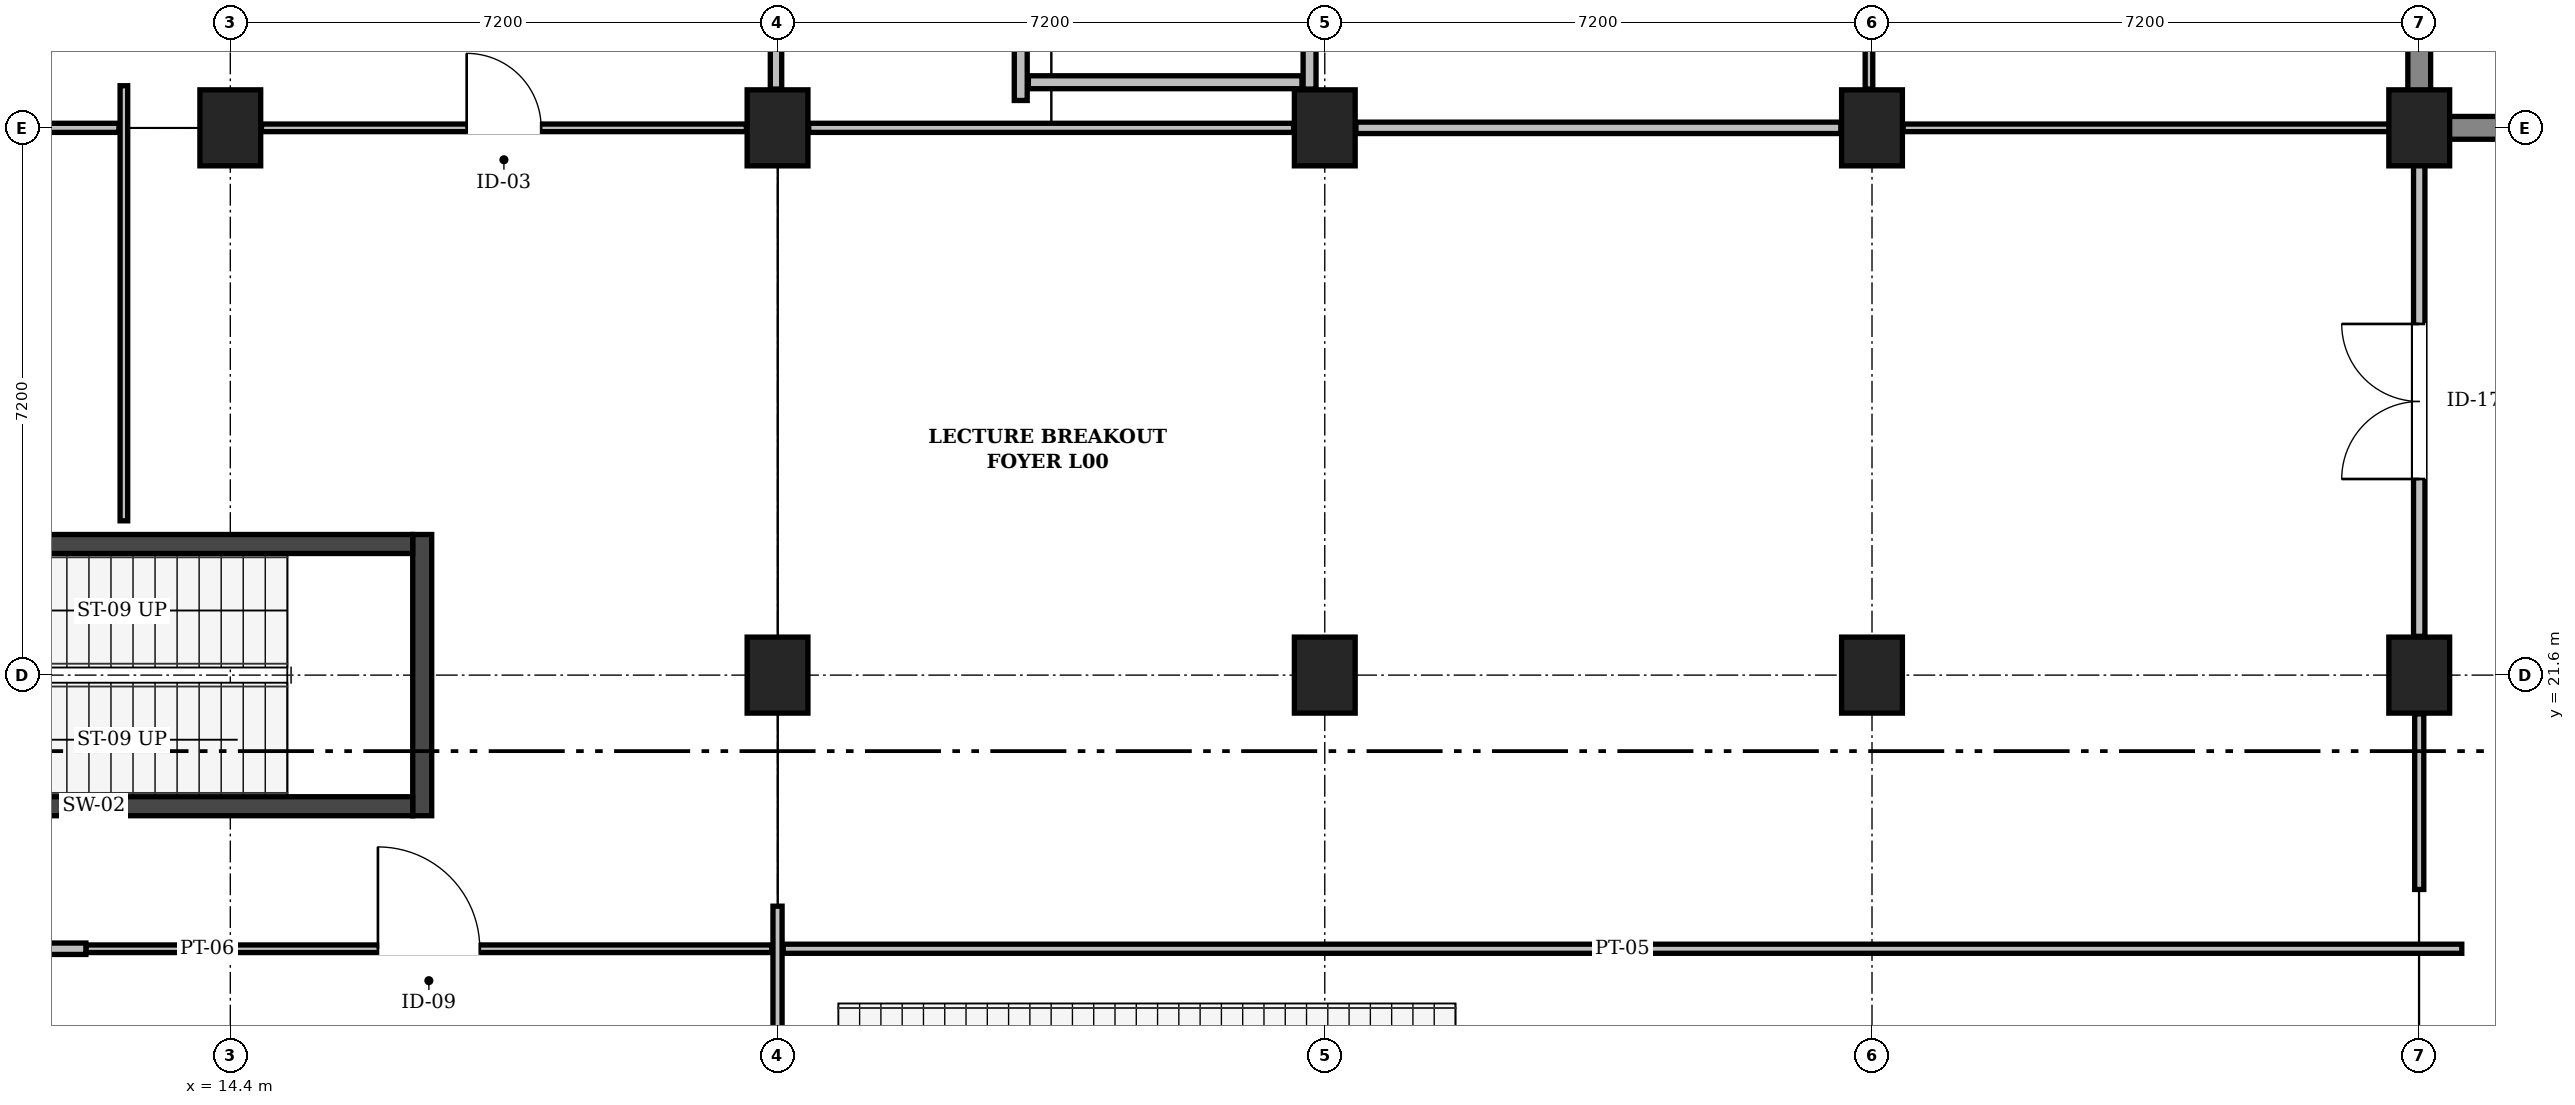
"""IFC4 building model, lengths in metres.
Left out: names, types, materials, properties, quantities, classifications, styles, units other than length and angle.
Written with IfcOpenShell. Run it as: python <this file> out.ifc"""

import sys

from ifc_helpers import new_model, si_unit, direction, frame, frame_2d, origin, origin_2d, place, context, subcontext, project, spatial, rectangle, extrude, element, fill, save


model = new_model("IFC4")
c1 = context("Model", 3, precision=1e-05, world=origin(), true_north=direction((0.0, 1.0)))
c2 = subcontext(c1, "Body", "Model", "MODEL_VIEW")
j1 = project(units=[si_unit("LENGTHUNIT", "METRE"), si_unit("PLANEANGLEUNIT", "RADIAN")], contexts=[c1])
p1 = place(None, origin())
s1 = spatial("IfcSite", under=j1, at=p1, CompositionType="ELEMENT")
p2 = place(p1, origin())
s2 = spatial("IfcBuilding", under=s1, at=p2, CompositionType="ELEMENT")
p3 = place(p2, origin())
s3 = spatial("IfcBuildingStorey", under=s2, at=p3, CompositionType="ELEMENT", Elevation=0.0)
for number, where, z_axis, x_axis in (
    (1, (14.4, 28.8, 0.0), (0.0, 0.0, 1.0), (1.0, 0.0, 0.0)),
    (2, (21.6, 21.6, 0.0), (0.0, 0.0, 1.0), (1.0, 0.0, 0.0)),
    (3, (21.6, 28.8, 0.0), (0.0, 0.0, 1.0), (1.0, 0.0, 0.0)),
    (4, (28.8, 21.6, 0.0), (0.0, 0.0, 1.0), (1.0, 0.0, 0.0)),
    (5, (28.8, 28.8, 0.0), (0.0, 0.0, 1.0), (1.0, 0.0, 0.0)),
    (6, (36.0, 21.6, 0.0), (0.0, 0.0, 1.0), (1.0, 0.0, 0.0)),
    (7, (36.0, 28.8, 0.0), (0.0, 0.0, 1.0), (1.0, 0.0, 0.0)),
    (8, (43.2, 21.6, 0.0), (0.0, 0.0, 1.0), (1.0, 0.0, 0.0)),
    (9, (43.2, 28.8, 0.0), (0.0, 0.0, 1.0), (1.0, 0.0, 0.0)),
):
    element("IfcColumn", number, at=place(p3, frame(where, z_axis=z_axis, x_axis=x_axis)), inside=s3, PredefinedType="COLUMN", context=c2, shape_type="SweptSolid", body=[
        extrude(rectangle(XDim=0.8, YDim=1.0, at=origin_2d()), origin(), (0.0, 0.0, 1.0), 4.8),
    ])
p4 = place(p3, frame((43.2, 36.0, 0.0), z_axis=(0.0, 0.0, 1.0), x_axis=(0.0, -1.0, 0.0)))
e10 = element("IfcWall", 10, at=p4, inside=s3, PredefinedType="SOLIDWALL", context=c2, shape_type="SweptSolid", body=[
    extrude(rectangle(XDim=7.034, YDim=0.3, at=frame_2d((3.517, 0.0))), origin(), (0.0, 0.0, 1.0), 4.52),
])
p5 = place(p4, frame((4.702, 0.0, 0.95)))
e11 = element("IfcOpeningElement", 11, at=p5, cuts=e10, PredefinedType="OPENING", context=c2, shape_type="SweptSolid", body=[
    extrude(rectangle(XDim=0.95, YDim=2.05, at=frame_2d((0.475, 1.025))), frame((0.0, 0.162, 0.0), z_axis=(0.0, -1.0, 0.0), x_axis=(1.0, 0.0, 0.0)), (0.0, 0.0, 1.0), 0.324),
])
p6 = place(p3, frame((43.05, 28.8, 0.0), z_axis=(0.0, 0.0, 1.0), x_axis=(1.0, 0.0, 0.0)))
e12 = element("IfcWall", 12, at=p6, inside=s3, PredefinedType="SOLIDWALL", context=c2, shape_type="SweptSolid", body=[
    extrude(rectangle(XDim=7.35, YDim=0.3, at=frame_2d((3.675, 0.0))), origin(), (0.0, 0.0, 1.0), 4.52),
])
p7 = place(p6, frame((3.0, 0.0, 0.95)))
e13 = element("IfcOpeningElement", 13, at=p7, cuts=e12, PredefinedType="OPENING", context=c2, shape_type="SweptSolid", body=[
    extrude(rectangle(XDim=1.35, YDim=2.05, at=frame_2d((0.675, 1.025))), frame((0.0, 0.162, 0.0), z_axis=(0.0, -1.0, 0.0), x_axis=(1.0, 0.0, 0.0)), (0.0, 0.0, 1.0), 0.324),
])
p8 = place(p3, frame((16.925, 19.75, 0.0), z_axis=(0.0, 0.0, 1.0), x_axis=(0.0, 1.0, 0.0)))
e14 = element("IfcWall", 14, at=p8, inside=s3, PredefinedType="SHEAR", context=c2, shape_type="SweptSolid", body=[
    extrude(rectangle(XDim=3.7, YDim=0.25, at=frame_2d((1.85, 0.0))), origin(), (0.0, 0.0, 1.0), 4.55),
])
for number, where, z_axis, x_axis in (
    (15, (9.2, 19.875, 0.0), (0.0, 0.0, 1.0), (1.0, 0.0, 0.0)),
    (16, (9.2, 23.325, 0.0), (0.0, 0.0, 1.0), (1.0, 0.0, 0.0)),
):
    element("IfcWall", number, at=place(p3, frame(where, z_axis=z_axis, x_axis=x_axis)), inside=s3, PredefinedType="SHEAR", context=c2, shape_type="SweptSolid", body=[
        extrude(rectangle(XDim=7.6, YDim=0.25, at=frame_2d((3.8, 0.0))), origin(), (0.0, 0.0, 1.0), 4.55),
    ])
p9 = place(p3, frame((24.8, 29.16, 0.0), z_axis=(0.0, 0.0, 1.0), x_axis=(0.0, 1.0, 0.0)))
e17 = element("IfcWall", 17, at=p9, inside=s3, PredefinedType="PARTITIONING", context=c2, shape_type="SweptSolid", body=[
    extrude(rectangle(XDim=17.011, YDim=0.17, at=frame_2d((8.506, 0.0))), origin(), (0.0, 0.0, 1.0), 4.46),
])
p10 = place(p9, frame((7.936, 0.0, 0.0)))
e18 = element("IfcOpeningElement", 18, at=p10, cuts=e17, PredefinedType="OPENING", context=c2, shape_type="SweptSolid", body=[
    extrude(rectangle(XDim=1.14, YDim=2.2, at=frame_2d((0.57, 1.1))), frame((0.0, 0.097, 0.0), z_axis=(0.0, -1.0, 0.0), x_axis=(1.0, 0.0, 0.0)), (0.0, 0.0, 1.0), 0.194),
])
p11 = place(p3, frame((28.6, 29.31, 0.0), z_axis=(0.0, 0.0, 1.0), x_axis=(0.0, 1.0, 0.0)))
e19 = element("IfcWall", 19, at=p11, inside=s3, PredefinedType="PARTITIONING", context=c2, shape_type="SweptSolid", body=[
    extrude(rectangle(XDim=3.721, YDim=0.17, at=frame_2d((1.861, 0.0))), origin(), (0.0, 0.0, 1.0), 4.08),
])
p12 = place(p3, frame((24.9, 29.4, 0.0), z_axis=(0.0, 0.0, 1.0), x_axis=(1.0, 0.0, 0.0)))
e20 = element("IfcWall", 20, at=p12, inside=s3, PredefinedType="PARTITIONING", context=c2, shape_type="SweptSolid", body=[
    extrude(rectangle(XDim=3.6, YDim=0.17, at=frame_2d((1.8, 0.0))), origin(), (0.0, 0.0, 1.0), 4.46),
])
p13 = place(p3, frame((21.6, 14.91, 0.0), z_axis=(0.0, 0.0, 1.0), x_axis=(0.0, 1.0, 0.0)))
e21 = element("IfcWall", 21, at=p13, inside=s3, PredefinedType="PARTITIONING", context=c2, shape_type="SweptSolid", body=[
    extrude(rectangle(XDim=3.65, YDim=0.12, at=frame_2d((1.825, 0.0))), origin(), (0.0, 0.0, 1.0), 4.08),
])
p14 = place(p3, frame((12.5, 18.0, 0.0), z_axis=(0.0, 0.0, 1.0), x_axis=(1.0, 0.0, 0.0)))
e22 = element("IfcWall", 22, at=p14, inside=s3, PredefinedType="PARTITIONING", context=c2, shape_type="SweptSolid", body=[
    extrude(rectangle(XDim=9.025, YDim=0.1, at=frame_2d((4.512, 0.0))), origin(), (0.0, 0.0, 1.0), 4.46),
])
p15 = place(p14, frame((3.843, 0.0, 0.0)))
e23 = element("IfcOpeningElement", 23, at=p15, cuts=e22, PredefinedType="OPENING", context=c2, shape_type="SweptSolid", body=[
    extrude(rectangle(XDim=1.34, YDim=2.24, at=frame_2d((0.67, 1.12))), frame((0.0, 0.062, 0.0), z_axis=(0.0, -1.0, 0.0), x_axis=(1.0, 0.0, 0.0)), (0.0, 0.0, 1.0), 0.124),
])
p16 = place(p3, frame((9.0, 18.0, 0.0), z_axis=(0.0, 0.0, 1.0), x_axis=(1.0, 0.0, 0.0)))
e24 = element("IfcWall", 24, at=p16, inside=s3, PredefinedType="PARTITIONING", context=c2, shape_type="SweptSolid", body=[
    extrude(rectangle(XDim=3.5, YDim=0.15, at=frame_2d((1.75, 0.0))), origin(), (0.0, 0.0, 1.0), 4.46),
])
p17 = place(p3, frame((21.675, 18.0, 0.0), z_axis=(0.0, 0.0, 1.0), x_axis=(1.0, 0.0, 0.0)))
e25 = element("IfcWall", 25, at=p17, inside=s3, PredefinedType="PARTITIONING", context=c2, shape_type="SweptSolid", body=[
    extrude(rectangle(XDim=22.085, YDim=0.12, at=frame_2d((11.042, 0.0))), origin(), (0.0, 0.0, 1.0), 4.46),
])
p18 = place(p3, frame((13.0, 23.63, 0.0), z_axis=(0.0, 0.0, 1.0), x_axis=(0.0, 1.0, 0.0)))
e26 = element("IfcWall", 26, at=p18, inside=s3, PredefinedType="PARTITIONING", context=c2, shape_type="SweptSolid", body=[
    extrude(rectangle(XDim=5.724, YDim=0.1, at=frame_2d((2.862, 0.0))), origin(), (0.0, 0.0, 1.0), 4.46),
])
p19 = place(p3, frame((43.2, 22.11, 0.0), z_axis=(0.0, 0.0, 1.0), x_axis=(0.0, 1.0, 0.0)))
e27 = element("IfcWall", 27, at=p19, inside=s3, PredefinedType="PARTITIONING", context=c2, shape_type="SweptSolid", body=[
    extrude(rectangle(XDim=6.528, YDim=0.15, at=frame_2d((3.264, 0.0))), origin(), (0.0, 0.0, 1.0), 4.08),
])
p20 = place(p19, frame((2.07, 0.0, 0.0)))
e28 = element("IfcOpeningElement", 28, at=p20, cuts=e27, PredefinedType="OPENING", context=c2, shape_type="SweptSolid", body=[
    extrude(rectangle(XDim=2.04, YDim=2.34, at=frame_2d((1.02, 1.17))), frame((0.0, 0.087, 0.0), z_axis=(0.0, -1.0, 0.0), x_axis=(1.0, 0.0, 0.0)), (0.0, 0.0, 1.0), 0.174),
])
p21 = place(p3, frame((43.2, 18.78, 0.0), z_axis=(0.0, 0.0, 1.0), x_axis=(0.0, 1.0, 0.0)))
e29 = element("IfcWall", 29, at=p21, inside=s3, PredefinedType="PARTITIONING", context=c2, shape_type="SweptSolid", body=[
    extrude(rectangle(XDim=2.31, YDim=0.12, at=frame_2d((1.155, 0.0))), origin(), (0.0, 0.0, 1.0), 4.08),
])
p22 = place(p3, frame((14.81, 28.8, 0.0), z_axis=(0.0, 0.0, 1.0), x_axis=(1.0, 0.0, 0.0)))
e30 = element("IfcWall", 30, at=p22, inside=s3, PredefinedType="PARTITIONING", context=c2, shape_type="SweptSolid", body=[
    extrude(rectangle(XDim=6.38, YDim=0.1, at=frame_2d((3.19, 0.0))), origin(), (0.0, 0.0, 1.0), 3.83),
])
p23 = place(p22, frame((2.7, 0.0, 0.0)))
e31 = element("IfcOpeningElement", 31, at=p23, cuts=e30, PredefinedType="OPENING", context=c2, shape_type="SweptSolid", body=[
    extrude(rectangle(XDim=0.98, YDim=2.14, at=frame_2d((0.49, 1.07))), frame((0.0, 0.062, 0.0), z_axis=(0.0, -1.0, 0.0), x_axis=(1.0, 0.0, 0.0)), (0.0, 0.0, 1.0), 0.124),
])
p24 = place(p3, frame((29.21, 28.8, 0.0), z_axis=(0.0, 0.0, 1.0), x_axis=(1.0, 0.0, 0.0)))
e32 = element("IfcWall", 32, at=p24, inside=s3, PredefinedType="PARTITIONING", context=c2, shape_type="SweptSolid", body=[
    extrude(rectangle(XDim=6.38, YDim=0.15, at=frame_2d((3.19, 0.0))), origin(), (0.0, 0.0, 1.0), 3.83),
])
p25 = place(p3, frame((22.01, 28.8, 0.0), z_axis=(0.0, 0.0, 1.0), x_axis=(1.0, 0.0, 0.0)))
e33 = element("IfcWall", 33, at=p25, inside=s3, PredefinedType="PARTITIONING", context=c2, shape_type="SweptSolid", body=[
    extrude(rectangle(XDim=6.38, YDim=0.12, at=frame_2d((3.19, 0.0))), origin(), (0.0, 0.0, 1.0), 3.83),
])
p26 = place(p3, frame((36.41, 28.8, 0.0), z_axis=(0.0, 0.0, 1.0), x_axis=(1.0, 0.0, 0.0)))
e34 = element("IfcWall", 34, at=p26, inside=s3, PredefinedType="PARTITIONING", context=c2, shape_type="SweptSolid", body=[
    extrude(rectangle(XDim=6.628, YDim=0.1, at=frame_2d((3.314, 0.0))), origin(), (0.0, 0.0, 1.0), 3.83),
])
p27 = place(p3, frame((9.9, 28.8, 0.0), z_axis=(0.0, 0.0, 1.0), x_axis=(1.0, 0.0, 0.0)))
e35 = element("IfcWall", 35, at=p27, inside=s3, PredefinedType="PARTITIONING", context=c2, shape_type="SweptSolid", body=[
    extrude(rectangle(XDim=3.035, YDim=0.12, at=frame_2d((1.518, 0.0))), origin(), (0.0, 0.0, 1.0), 3.83),
])
p28 = place(p3, frame((21.58, 29.31, 0.0), z_axis=(0.0, 0.0, 1.0), x_axis=(0.0, 1.0, 0.0)))
e36 = element("IfcWall", 36, at=p28, inside=s3, PredefinedType="PARTITIONING", context=c2, shape_type="SweptSolid", body=[
    extrude(rectangle(XDim=6.205, YDim=0.15, at=frame_2d((3.103, 0.0))), origin(), (0.0, 0.0, 1.0), 4.08),
])
p29 = place(p3, frame((35.96, 29.31, 0.0), z_axis=(0.0, 0.0, 1.0), x_axis=(0.0, 1.0, 0.0)))
e37 = element("IfcWall", 37, at=p29, inside=s3, PredefinedType="PARTITIONING", context=c2, shape_type="SweptSolid", body=[
    extrude(rectangle(XDim=3.12, YDim=0.1, at=frame_2d((1.56, 0.0))), origin(), (0.0, 0.0, 1.0), 4.08),
])
p30 = place(p15, origin())
e38 = element("IfcDoor", 38, at=p30, inside=s3, OperationType="SINGLE_SWING_LEFT", PredefinedType="DOOR", context=c2, shape_type="SweptSolid", body=[
    extrude(rectangle(XDim=1.34, YDim=2.24, at=frame_2d((0.67, 1.12))), frame((0.0, 0.025, 0.0), z_axis=(0.0, -1.0, 0.0), x_axis=(1.0, 0.0, 0.0)), (0.0, 0.0, 1.0), 0.05),
])
fill(e23, e38)
p31 = place(p23, origin())
e39 = element("IfcDoor", 39, at=p31, inside=s3, OperationType="SINGLE_SWING_LEFT", PredefinedType="DOOR", context=c2, shape_type="SweptSolid", body=[
    extrude(rectangle(XDim=0.98, YDim=2.14, at=frame_2d((0.49, 1.07))), frame((0.0, 0.025, 0.0), z_axis=(0.0, -1.0, 0.0), x_axis=(1.0, 0.0, 0.0)), (0.0, 0.0, 1.0), 0.05),
])
fill(e31, e39)
p32 = place(p20, origin())
e40 = element("IfcDoor", 40, at=p32, inside=s3, OperationType="DOUBLE_DOOR_SINGLE_SWING", PredefinedType="DOOR", context=c2, shape_type="SweptSolid", body=[
    extrude(rectangle(XDim=2.04, YDim=2.34, at=frame_2d((1.02, 1.17))), frame((0.0, 0.025, 0.0), z_axis=(0.0, -1.0, 0.0), x_axis=(1.0, 0.0, 0.0)), (0.0, 0.0, 1.0), 0.05),
])
fill(e28, e40)
save(model, sys.argv[1])
